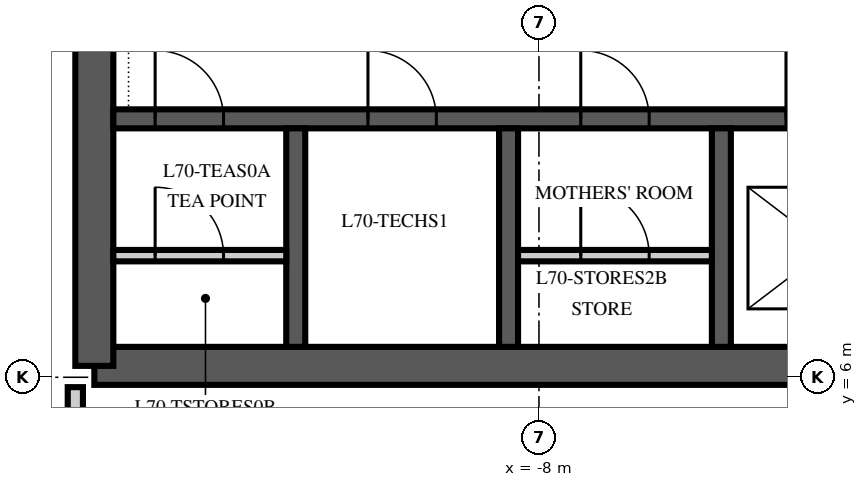
"""IFC4 building model, lengths in metres.
Left out: names, types, materials, properties, quantities, classifications, styles, units other than length and angle.
Written with IfcOpenShell. Run it as: python <this file> out.ifc"""

import sys

from ifc_helpers import new_model, si_unit, direction, frame, frame_2d, origin, place, context, subcontext, project, spatial, polyline, rectangle, outline, extrude, element, fill, save


model = new_model("IFC4")
c1 = context("Model", 3, precision=1e-05, world=origin(), true_north=direction((0.0, 1.0)))
c2 = subcontext(c1, "Body", "Model", "MODEL_VIEW")
j1 = project(units=[si_unit("LENGTHUNIT", "METRE"), si_unit("PLANEANGLEUNIT", "RADIAN")], contexts=[c1])
p1 = place(None, origin())
s1 = spatial("IfcSite", under=j1, at=p1, CompositionType="ELEMENT")
p2 = place(p1, origin())
s2 = spatial("IfcBuilding", under=s1, at=p2, CompositionType="ELEMENT")
p3 = place(p2, frame((0.0, 0.0, 300.0)))
s3 = spatial("IfcBuildingStorey", under=s2, at=p3, CompositionType="ELEMENT", Elevation=300.0)
p4 = place(p3, frame((-13.85, 6.15, 0.0), z_axis=(0.0, 0.0, 1.0), x_axis=(1.0, 0.0, 0.0)))
e1 = element("IfcWall", 1, at=p4, inside=s3, PredefinedType="SHEAR", context=c2, shape_type="SweptSolid", body=[
    extrude(rectangle(XDim=27.7, YDim=0.5, at=frame_2d((13.85, 0.0))), origin(), (0.0, 0.0, 1.0), 4.0),
])
p5 = place(p3, frame((-13.85, 23.85, 0.0), z_axis=(0.0, 0.0, 1.0), x_axis=(0.0, -1.0, 0.0)))
e2 = element("IfcWall", 2, at=p5, inside=s3, PredefinedType="SHEAR", context=c2, shape_type="SweptSolid", body=[
    extrude(outline(polyline([(0.0, -0.25), (17.7, -0.25), (17.7, 0.0), (17.45, 0.0), (17.45, 0.25), (0.25, 0.25), (0.25, 0.0), (0.0, 0.0), (0.0, -0.25)])), origin(), (0.0, 0.0, 1.0), 4.0),
])
p6 = place(p5, frame((11.75, 0.0, 0.0)))
e3 = element("IfcOpeningElement", 3, at=p6, cuts=e2, PredefinedType="OPENING", context=c2, shape_type="SweptSolid", body=[
    extrude(rectangle(XDim=1.8, YDim=2.4, at=frame_2d((0.9, 1.2))), frame((0.0, 0.265, 0.0), z_axis=(0.0, -1.0, 0.0), x_axis=(1.0, 0.0, 0.0)), (0.0, 0.0, 1.0), 0.53),
])
p7 = place(p3, frame((-13.6, 9.4, 0.0), z_axis=(0.0, 0.0, 1.0), x_axis=(1.0, 0.0, 0.0)))
e4 = element("IfcWall", 4, at=p7, inside=s3, PredefinedType="SHEAR", context=c2, shape_type="SweptSolid", body=[
    extrude(rectangle(XDim=27.2, YDim=0.25, at=frame_2d((13.6, 0.0))), origin(), (0.0, 0.0, 1.0), 4.0),
])
p8 = place(p7, frame((8.85, 0.0, 0.0)))
e5 = element("IfcOpeningElement", 5, at=p8, cuts=e4, PredefinedType="OPENING", context=c2, shape_type="SweptSolid", body=[
    extrude(rectangle(XDim=1.1, YDim=2.1, at=frame_2d((0.55, 1.05))), frame((0.0, 0.14, 0.0), z_axis=(0.0, -1.0, 0.0), x_axis=(1.0, 0.0, 0.0)), (0.0, 0.0, 1.0), 0.28),
])
p9 = place(p7, frame((11.65, 0.0, 0.0)))
e6 = element("IfcOpeningElement", 6, at=p9, cuts=e4, PredefinedType="OPENING", context=c2, shape_type="SweptSolid", body=[
    extrude(rectangle(XDim=1.1, YDim=2.1, at=frame_2d((0.55, 1.05))), frame((0.0, 0.14, 0.0), z_axis=(0.0, -1.0, 0.0), x_axis=(1.0, 0.0, 0.0)), (0.0, 0.0, 1.0), 0.28),
])
p10 = place(p7, frame((14.45, 0.0, 0.0)))
e7 = element("IfcOpeningElement", 7, at=p10, cuts=e4, PredefinedType="OPENING", context=c2, shape_type="SweptSolid", body=[
    extrude(rectangle(XDim=1.1, YDim=2.1, at=frame_2d((0.55, 1.05))), frame((0.0, 0.14, 0.0), z_axis=(0.0, -1.0, 0.0), x_axis=(1.0, 0.0, 0.0)), (0.0, 0.0, 1.0), 0.28),
])
p11 = place(p7, frame((0.55, 0.0, 0.0)))
e8 = element("IfcOpeningElement", 8, at=p11, cuts=e4, PredefinedType="OPENING", context=c2, shape_type="SweptSolid", body=[
    extrude(rectangle(XDim=0.9, YDim=2.1, at=frame_2d((0.45, 1.05))), frame((0.0, 0.14, 0.0), z_axis=(0.0, -1.0, 0.0), x_axis=(1.0, 0.0, 0.0)), (0.0, 0.0, 1.0), 0.28),
])
p12 = place(p7, frame((3.35, 0.0, 0.0)))
e9 = element("IfcOpeningElement", 9, at=p12, cuts=e4, PredefinedType="OPENING", context=c2, shape_type="SweptSolid", body=[
    extrude(rectangle(XDim=0.9, YDim=2.1, at=frame_2d((0.45, 1.05))), frame((0.0, 0.14, 0.0), z_axis=(0.0, -1.0, 0.0), x_axis=(1.0, 0.0, 0.0)), (0.0, 0.0, 1.0), 0.28),
])
p13 = place(p7, frame((6.15, 0.0, 0.0)))
e10 = element("IfcOpeningElement", 10, at=p13, cuts=e4, PredefinedType="OPENING", context=c2, shape_type="SweptSolid", body=[
    extrude(rectangle(XDim=0.9, YDim=2.1, at=frame_2d((0.45, 1.05))), frame((0.0, 0.14, 0.0), z_axis=(0.0, -1.0, 0.0), x_axis=(1.0, 0.0, 0.0)), (0.0, 0.0, 1.0), 0.28),
])
p14 = place(p7, frame((17.35, 0.0, 0.0)))
e11 = element("IfcOpeningElement", 11, at=p14, cuts=e4, PredefinedType="OPENING", context=c2, shape_type="SweptSolid", body=[
    extrude(rectangle(XDim=0.9, YDim=2.1, at=frame_2d((0.45, 1.05))), frame((0.0, 0.14, 0.0), z_axis=(0.0, -1.0, 0.0), x_axis=(1.0, 0.0, 0.0)), (0.0, 0.0, 1.0), 0.28),
])
p15 = place(p7, frame((20.15, 0.0, 0.0)))
e12 = element("IfcOpeningElement", 12, at=p15, cuts=e4, PredefinedType="OPENING", context=c2, shape_type="SweptSolid", body=[
    extrude(rectangle(XDim=0.9, YDim=2.1, at=frame_2d((0.45, 1.05))), frame((0.0, 0.14, 0.0), z_axis=(0.0, -1.0, 0.0), x_axis=(1.0, 0.0, 0.0)), (0.0, 0.0, 1.0), 0.28),
])
p16 = place(p7, frame((22.95, 0.0, 0.0)))
e13 = element("IfcOpeningElement", 13, at=p16, cuts=e4, PredefinedType="OPENING", context=c2, shape_type="SweptSolid", body=[
    extrude(rectangle(XDim=0.9, YDim=2.1, at=frame_2d((0.45, 1.05))), frame((0.0, 0.14, 0.0), z_axis=(0.0, -1.0, 0.0), x_axis=(1.0, 0.0, 0.0)), (0.0, 0.0, 1.0), 0.28),
])
for number, where, z_axis, x_axis in (
    (14, (-11.2, 6.4, 0.0), (0.0, 0.0, 1.0), (0.0, 1.0, 0.0)),
    (15, (-8.4, 6.4, 0.0), (0.0, 0.0, 1.0), (0.0, 1.0, 0.0)),
    (16, (-5.6, 6.4, 0.0), (0.0, 0.0, 1.0), (0.0, 1.0, 0.0)),
):
    element("IfcWall", number, at=place(p3, frame(where, z_axis=z_axis, x_axis=x_axis)), inside=s3, PredefinedType="SHEAR", context=c2, shape_type="SweptSolid", body=[
        extrude(rectangle(XDim=2.875, YDim=0.25, at=frame_2d((1.438, 0.0))), origin(), (0.0, 0.0, 1.0), 4.0),
    ])
p17 = place(p3, frame((-13.6, 7.6, 0.0), z_axis=(0.0, 0.0, 1.0), x_axis=(1.0, 0.0, 0.0)))
e17 = element("IfcWall", 17, at=p17, inside=s3, PredefinedType="PARTITIONING", context=c2, shape_type="SweptSolid", body=[
    extrude(rectangle(XDim=2.275, YDim=0.15, at=frame_2d((1.138, 0.0))), origin(), (0.0, 0.0, 1.0), 3.85),
])
p18 = place(p17, frame((0.55, 0.0, 0.0)))
e18 = element("IfcOpeningElement", 18, at=p18, cuts=e17, PredefinedType="OPENING", context=c2, shape_type="SweptSolid", body=[
    extrude(rectangle(XDim=0.9, YDim=2.1, at=frame_2d((0.45, 1.05))), frame((0.0, 0.09, 0.0), z_axis=(0.0, -1.0, 0.0), x_axis=(1.0, 0.0, 0.0)), (0.0, 0.0, 1.0), 0.18),
])
p19 = place(p3, frame((-8.275, 7.6, 0.0), z_axis=(0.0, 0.0, 1.0), x_axis=(1.0, 0.0, 0.0)))
e19 = element("IfcWall", 19, at=p19, inside=s3, PredefinedType="PARTITIONING", context=c2, shape_type="SweptSolid", body=[
    extrude(rectangle(XDim=2.55, YDim=0.15, at=frame_2d((1.275, 0.0))), origin(), (0.0, 0.0, 1.0), 3.85),
])
p20 = place(p19, frame((0.825, 0.0, 0.0)))
e20 = element("IfcOpeningElement", 20, at=p20, cuts=e19, PredefinedType="OPENING", context=c2, shape_type="SweptSolid", body=[
    extrude(rectangle(XDim=0.9, YDim=2.1, at=frame_2d((0.45, 1.05))), frame((0.0, 0.09, 0.0), z_axis=(0.0, -1.0, 0.0), x_axis=(1.0, 0.0, 0.0)), (0.0, 0.0, 1.0), 0.18),
])
p21 = place(p3, frame((-14.1, 4.05, 0.0), z_axis=(0.0, 0.0, 1.0), x_axis=(0.0, 1.0, 0.0)))
e21 = element("IfcWall", 21, at=p21, inside=s3, PredefinedType="PARTITIONING", context=c2, shape_type="SweptSolid", body=[
    extrude(rectangle(XDim=1.82, YDim=0.2, at=frame_2d((0.91, 0.0))), origin(), (0.0, 0.0, 1.0), 3.85),
])
p22 = place(p8, origin())
e22 = element("IfcDoor", 22, at=p22, inside=s3, OperationType="SLIDING_TO_LEFT", PredefinedType="DOOR", context=c2, shape_type="SweptSolid", body=[
    extrude(rectangle(XDim=1.1, YDim=2.1, at=frame_2d((0.55, 1.05))), frame((0.0, 0.125, 0.0), z_axis=(0.0, -1.0, 0.0), x_axis=(1.0, 0.0, 0.0)), (0.0, 0.0, 1.0), 0.25),
])
fill(e5, e22)
p23 = place(p11, origin())
e23 = element("IfcDoor", 23, at=p23, inside=s3, OperationType="SINGLE_SWING_LEFT", PredefinedType="DOOR", context=c2, shape_type="SweptSolid", body=[
    extrude(rectangle(XDim=0.9, YDim=2.1, at=frame_2d((0.45, 1.05))), frame((0.0, 0.125, 0.0), z_axis=(0.0, -1.0, 0.0), x_axis=(1.0, 0.0, 0.0)), (0.0, 0.0, 1.0), 0.25),
])
fill(e8, e23)
p24 = place(p18, origin())
e24 = element("IfcDoor", 24, at=p24, inside=s3, OperationType="SINGLE_SWING_LEFT", PredefinedType="DOOR", context=c2, shape_type="SweptSolid", body=[
    extrude(rectangle(XDim=0.9, YDim=2.1, at=frame_2d((0.45, 1.05))), frame((0.0, 0.075, 0.0), z_axis=(0.0, -1.0, 0.0), x_axis=(1.0, 0.0, 0.0)), (0.0, 0.0, 1.0), 0.149),
])
fill(e18, e24)
p25 = place(p12, origin())
e25 = element("IfcDoor", 25, at=p25, inside=s3, OperationType="SINGLE_SWING_LEFT", PredefinedType="DOOR", context=c2, shape_type="SweptSolid", body=[
    extrude(rectangle(XDim=0.9, YDim=2.1, at=frame_2d((0.45, 1.05))), frame((0.0, 0.125, 0.0), z_axis=(0.0, -1.0, 0.0), x_axis=(1.0, 0.0, 0.0)), (0.0, 0.0, 1.0), 0.25),
])
fill(e9, e25)
p26 = place(p13, origin())
e26 = element("IfcDoor", 26, at=p26, inside=s3, OperationType="SINGLE_SWING_LEFT", PredefinedType="DOOR", context=c2, shape_type="SweptSolid", body=[
    extrude(rectangle(XDim=0.9, YDim=2.1, at=frame_2d((0.45, 1.05))), frame((0.0, 0.125, 0.0), z_axis=(0.0, -1.0, 0.0), x_axis=(1.0, 0.0, 0.0)), (0.0, 0.0, 1.0), 0.25),
])
fill(e10, e26)
p27 = place(p20, origin())
e27 = element("IfcDoor", 27, at=p27, inside=s3, OperationType="SINGLE_SWING_LEFT", PredefinedType="DOOR", context=c2, shape_type="SweptSolid", body=[
    extrude(rectangle(XDim=0.9, YDim=2.1, at=frame_2d((0.45, 1.05))), frame((0.0, 0.075, 0.0), z_axis=(0.0, -1.0, 0.0), x_axis=(1.0, 0.0, 0.0)), (0.0, 0.0, 1.0), 0.149),
])
fill(e20, e27)
save(model, sys.argv[1])
